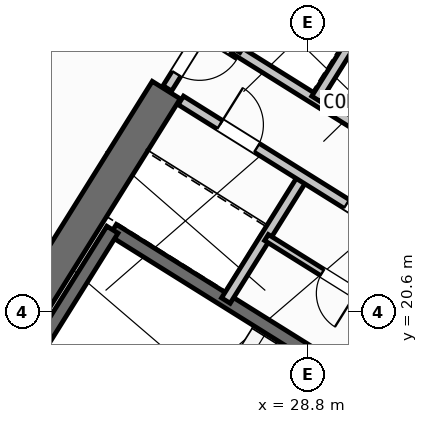
"""IFC4 building model, lengths in metres.
Left out: names, types, materials, properties, quantities, classifications, styles, units other than length and angle.
Written with IfcOpenShell. Run it as: python <this file> out.ifc"""

import sys

from ifc_helpers import new_model, si_unit, direction, frame, frame_2d, origin, place, context, subcontext, project, spatial, rectangle, extrude, source, transform, mapped, element, fill, save


model = new_model("IFC4")
c1 = context("Model", 3, precision=1e-05, world=origin(), true_north=direction((0.0, 1.0)))
c2 = subcontext(c1, "Body", "Model", "MODEL_VIEW")
j1 = project(units=[si_unit("LENGTHUNIT", "METRE"), si_unit("PLANEANGLEUNIT", "RADIAN")], contexts=[c1])
p1 = place(None, origin())
s1 = spatial("IfcSite", under=j1, at=p1, CompositionType="ELEMENT")
p2 = place(p1, origin())
s2 = spatial("IfcBuilding", under=s1, at=p2, CompositionType="ELEMENT")
p3 = place(p2, frame((0.0, 0.0, 42.0)))
s3 = spatial("IfcBuildingStorey", under=s2, at=p3, CompositionType="ELEMENT", Elevation=42.0)
p4 = place(p3, frame((40.615, 23.983, 0.0), z_axis=(0.0, 0.0, 1.0), x_axis=(-0.848045953968, 0.529922692436, 0.0)))
e1 = element("IfcWall", 1, at=p4, inside=s3, PredefinedType="SHEAR", context=c2, shape_type="SweptSolid", body=[
    extrude(rectangle(XDim=13.24, YDim=0.65, at=frame_2d((6.62, 0.0))), origin(), (0.0, 0.0, 1.0), 3.35),
])
p5 = place(p3, frame((26.007, 24.976, 0.0), z_axis=(0.0, 0.0, 1.0), x_axis=(-0.529916319127, -0.848049936456, 0.0)))
e2 = element("IfcWall", 2, at=p5, inside=s3, PredefinedType="SHEAR", context=c2, shape_type="SweptSolid", body=[
    extrude(rectangle(XDim=6.375, YDim=0.65, at=frame_2d((3.188, 0.0))), origin(), (0.0, 0.0, 1.0), 3.35),
])
p6 = place(p3, frame((29.268, 6.429, 0.0), z_axis=(0.0, 0.0, 1.0), x_axis=(-0.848049971435, 0.529916263149, 0.0)))
e3 = element("IfcWall", 3, at=p6, inside=s3, PredefinedType="STANDARD", context=c2, shape_type="SweptSolid", body=[
    extrude(rectangle(XDim=31.588, YDim=0.32, at=frame_2d((15.794, 0.0))), origin(), (0.0, 0.0, 1.0), 3.35),
])
p7 = place(p6, frame((16.362, 0.0, 0.0)))
e4 = element("IfcOpeningElement", 4, at=p7, cuts=e3, PredefinedType="OPENING", context=c2, shape_type="SweptSolid", body=[
    extrude(rectangle(XDim=1.2, YDim=2.15, at=frame_2d((0.6, 1.075))), frame((0.0, 0.17, 0.0), z_axis=(0.0, -1.0, 0.0), x_axis=(1.0, 0.0, 0.0)), (0.0, 0.0, 1.0), 0.34),
])
p8 = place(p6, frame((2.989, 0.0, 0.8)))
e5 = element("IfcOpeningElement", 5, at=p8, cuts=e3, PredefinedType="OPENING", context=c2, shape_type="SweptSolid", body=[
    extrude(rectangle(XDim=2.1, YDim=1.55, at=frame_2d((1.05, 0.775))), frame((0.0, 0.17, 0.0), z_axis=(0.0, -1.0, 0.0), x_axis=(1.0, 0.0, 0.0)), (0.0, 0.0, 1.0), 0.34),
])
p9 = place(p6, frame((8.359, 0.0, 0.8)))
e6 = element("IfcOpeningElement", 6, at=p9, cuts=e3, PredefinedType="OPENING", context=c2, shape_type="SweptSolid", body=[
    extrude(rectangle(XDim=2.1, YDim=1.55, at=frame_2d((1.05, 0.775))), frame((0.0, 0.17, 0.0), z_axis=(0.0, -1.0, 0.0), x_axis=(1.0, 0.0, 0.0)), (0.0, 0.0, 1.0), 0.34),
])
p10 = place(p6, frame((13.284, 0.0, 0.95)))
e7 = element("IfcOpeningElement", 7, at=p10, cuts=e3, PredefinedType="OPENING", context=c2, shape_type="SweptSolid", body=[
    extrude(rectangle(XDim=1.2, YDim=1.4, at=frame_2d((0.6, 0.7))), frame((0.0, 0.17, 0.0), z_axis=(0.0, -1.0, 0.0), x_axis=(1.0, 0.0, 0.0)), (0.0, 0.0, 1.0), 0.34),
])
p11 = place(p6, frame((20.39, 0.0, 0.95)))
e8 = element("IfcOpeningElement", 8, at=p11, cuts=e3, PredefinedType="OPENING", context=c2, shape_type="SweptSolid", body=[
    extrude(rectangle(XDim=1.2, YDim=1.4, at=frame_2d((0.6, 0.7))), frame((0.0, 0.17, 0.0), z_axis=(0.0, -1.0, 0.0), x_axis=(1.0, 0.0, 0.0)), (0.0, 0.0, 1.0), 0.34),
])
p12 = place(p6, frame((23.715, 0.0, 1.0)))
e9 = element("IfcOpeningElement", 9, at=p12, cuts=e3, PredefinedType="OPENING", context=c2, shape_type="SweptSolid", body=[
    extrude(rectangle(XDim=0.9, YDim=1.25, at=frame_2d((0.45, 0.625))), frame((0.0, 0.17, 0.0), z_axis=(0.0, -1.0, 0.0), x_axis=(1.0, 0.0, 0.0)), (0.0, 0.0, 1.0), 0.34),
])
p13 = place(p6, frame((27.481, 0.0, 0.8)))
e10 = element("IfcOpeningElement", 10, at=p13, cuts=e3, PredefinedType="OPENING", context=c2, shape_type="SweptSolid", body=[
    extrude(rectangle(XDim=2.1, YDim=1.55, at=frame_2d((1.05, 0.775))), frame((0.0, 0.17, 0.0), z_axis=(0.0, -1.0, 0.0), x_axis=(1.0, 0.0, 0.0)), (0.0, 0.0, 1.0), 0.34),
])
p14 = place(p3, frame((14.138, 41.825, 0.0), z_axis=(0.0, 0.0, 1.0), x_axis=(0.848046498049, -0.529921821731, 0.0)))
e11 = element("IfcWall", 11, at=p14, inside=s3, PredefinedType="STANDARD", context=c2, shape_type="SweptSolid", body=[
    extrude(rectangle(XDim=31.588, YDim=0.32, at=frame_2d((15.794, 0.0))), origin(), (0.0, 0.0, 1.0), 3.35),
])
p15 = place(p14, frame((3.369, 0.0, 0.0)))
e12 = element("IfcOpeningElement", 12, at=p15, cuts=e11, PredefinedType="OPENING", context=c2, shape_type="SweptSolid", body=[
    extrude(rectangle(XDim=1.05, YDim=2.15, at=frame_2d((0.525, 1.075))), frame((0.0, 0.17, 0.0), z_axis=(0.0, -1.0, 0.0), x_axis=(1.0, 0.0, 0.0)), (0.0, 0.0, 1.0), 0.34),
])
p16 = place(p14, frame((0.946, 0.0, 0.85)))
e13 = element("IfcOpeningElement", 13, at=p16, cuts=e11, PredefinedType="OPENING", context=c2, shape_type="SweptSolid", body=[
    extrude(rectangle(XDim=1.8, YDim=1.5, at=frame_2d((0.9, 0.75))), frame((0.0, 0.17, 0.0), z_axis=(0.0, -1.0, 0.0), x_axis=(1.0, 0.0, 0.0)), (0.0, 0.0, 1.0), 0.34),
])
p17 = place(p14, frame((8.46, 0.0, 0.85)))
e14 = element("IfcOpeningElement", 14, at=p17, cuts=e11, PredefinedType="OPENING", context=c2, shape_type="SweptSolid", body=[
    extrude(rectangle(XDim=1.8, YDim=1.5, at=frame_2d((0.9, 0.75))), frame((0.0, 0.17, 0.0), z_axis=(0.0, -1.0, 0.0), x_axis=(1.0, 0.0, 0.0)), (0.0, 0.0, 1.0), 0.34),
])
p18 = place(p14, frame((13.899, 0.0, 0.85)))
e15 = element("IfcOpeningElement", 15, at=p18, cuts=e11, PredefinedType="OPENING", context=c2, shape_type="SweptSolid", body=[
    extrude(rectangle(XDim=1.5, YDim=1.5, at=frame_2d((0.75, 0.75))), frame((0.0, 0.17, 0.0), z_axis=(0.0, -1.0, 0.0), x_axis=(1.0, 0.0, 0.0)), (0.0, 0.0, 1.0), 0.34),
])
p19 = place(p14, frame((22.019, 0.0, 0.95)))
e16 = element("IfcOpeningElement", 16, at=p19, cuts=e11, PredefinedType="OPENING", context=c2, shape_type="SweptSolid", body=[
    extrude(rectangle(XDim=1.2, YDim=1.4, at=frame_2d((0.6, 0.7))), frame((0.0, 0.17, 0.0), z_axis=(0.0, -1.0, 0.0), x_axis=(1.0, 0.0, 0.0)), (0.0, 0.0, 1.0), 0.34),
])
p20 = place(p14, frame((27.569, 0.0, 0.95)))
e17 = element("IfcOpeningElement", 17, at=p20, cuts=e11, PredefinedType="OPENING", context=c2, shape_type="SweptSolid", body=[
    extrude(rectangle(XDim=1.2, YDim=1.4, at=frame_2d((0.6, 0.7))), frame((0.0, 0.17, 0.0), z_axis=(0.0, -1.0, 0.0), x_axis=(1.0, 0.0, 0.0)), (0.0, 0.0, 1.0), 0.34),
])
p21 = place(p3, frame((31.28, 18.261, 0.0), z_axis=(0.0, 0.0, 1.0), x_axis=(-0.848051618787, 0.529913626805, 0.0)))
e18 = element("IfcWall", 18, at=p21, inside=s3, PredefinedType="SHEAR", context=c2, shape_type="SweptSolid", body=[
    extrude(rectangle(XDim=7.46, YDim=0.26, at=frame_2d((3.73, 0.0))), origin(), (0.0, 0.0, 1.0), 3.35),
])
p22 = place(p21, frame((0.36, 0.0, 0.0)))
e19 = element("IfcOpeningElement", 19, at=p22, cuts=e18, PredefinedType="OPENING", context=c2, shape_type="SweptSolid", body=[
    extrude(rectangle(XDim=0.86, YDim=2.05, at=frame_2d((0.43, 1.025))), frame((0.0, 0.14, 0.0), z_axis=(0.0, -1.0, 0.0), x_axis=(1.0, 0.0, 0.0)), (0.0, 0.0, 1.0), 0.28),
])
p23 = place(p3, frame((24.945, 22.22, 0.0), z_axis=(0.0, 0.0, 1.0), x_axis=(-0.529908658664, -0.84805472316, 0.0)))
e20 = element("IfcWall", 20, at=p23, inside=s3, PredefinedType="SHEAR", context=c2, shape_type="SweptSolid", body=[
    extrude(rectangle(XDim=3.16, YDim=0.26, at=frame_2d((1.58, 0.0))), origin(), (0.0, 0.0, 1.0), 3.35),
])
p24 = place(p3, frame((31.822, 24.998, 0.0), z_axis=(0.0, 0.0, 1.0), x_axis=(-0.848058348634, 0.529902856485, 0.0)))
e21 = element("IfcWall", 21, at=p24, inside=s3, PredefinedType="STANDARD", context=c2, shape_type="SweptSolid", body=[
    extrude(rectangle(XDim=4.568, YDim=0.2, at=frame_2d((2.284, 0.0))), origin(), (0.0, 0.0, 1.0), 3.34),
])
p25 = place(p3, frame((32.108, 22.814, 0.0), z_axis=(0.0, 0.0, 1.0), x_axis=(-0.848042229521, 0.529928652696, 0.0)))
e22 = element("IfcWall", 22, at=p25, inside=s3, PredefinedType="STANDARD", context=c2, shape_type="SweptSolid", body=[
    extrude(rectangle(XDim=5.62, YDim=0.2, at=frame_2d((2.81, 0.0))), origin(), (0.0, 0.0, 1.0), 3.34),
])
p26 = place(p3, frame((28.25, 27.17, 0.0), z_axis=(0.0, 0.0, 1.0), x_axis=(-0.529905827651, -0.848056492117, 0.0)))
e23 = element("IfcWall", 23, at=p26, inside=s3, PredefinedType="STANDARD", context=c2, shape_type="SweptSolid", body=[
    extrude(rectangle(XDim=1.65, YDim=0.2, at=frame_2d((0.825, 0.0))), origin(), (0.0, 0.0, 1.0), 3.34),
])
p27 = place(p3, frame((29.801, 26.142, 0.0), z_axis=(0.0, 0.0, 1.0), x_axis=(-0.529998940003, -0.847998304005, 0.0)))
e24 = element("IfcWall", 24, at=p27, inside=s3, PredefinedType="STANDARD", context=c2, shape_type="SweptSolid", body=[
    extrude(rectangle(XDim=1.58, YDim=0.2, at=frame_2d((0.79, 0.0))), origin(), (0.0, 0.0, 1.0), 3.34),
])
p28 = place(p3, frame((28.71, 23.263, 0.0), z_axis=(0.0, 0.0, 1.0), x_axis=(-0.529907497854, -0.848055448493, 0.0)))
e25 = element("IfcWall", 25, at=p28, inside=s3, PredefinedType="STANDARD", context=c2, shape_type="SweptSolid", body=[
    extrude(rectangle(XDim=2.88, YDim=0.2, at=frame_2d((1.44, 0.0))), origin(), (0.0, 0.0, 1.0), 3.34),
])
p29 = place(p3, frame((31.525, 21.504, 0.0), z_axis=(0.0, 0.0, 1.0), x_axis=(-0.848044998614, 0.529924221305, 0.0)))
e26 = element("IfcWall", 26, at=p29, inside=s3, PredefinedType="STANDARD", context=c2, shape_type="SweptSolid", body=[
    extrude(rectangle(XDim=6.168, YDim=0.2, at=frame_2d((3.084, 0.0))), origin(), (0.0, 0.0, 1.0), 3.34),
])
p30 = place(p29, frame((4.4, 0.0, 0.0)))
e27 = element("IfcOpeningElement", 27, at=p30, cuts=e26, PredefinedType="OPENING", context=c2, shape_type="SweptSolid", body=[
    extrude(rectangle(XDim=0.86, YDim=2.05, at=frame_2d((0.43, 1.025))), frame((0.0, 0.11, 0.0), z_axis=(0.0, -1.0, 0.0), x_axis=(1.0, 0.0, 0.0)), (0.0, 0.0, 1.0), 0.22),
])
p31 = place(p29, frame((1.45, 0.0, 0.0)))
e28 = element("IfcOpeningElement", 28, at=p31, cuts=e26, PredefinedType="OPENING", context=c2, shape_type="SweptSolid", body=[
    extrude(rectangle(XDim=0.86, YDim=2.05, at=frame_2d((0.43, 1.025))), frame((0.0, 0.11, 0.0), z_axis=(0.0, -1.0, 0.0), x_axis=(1.0, 0.0, 0.0)), (0.0, 0.0, 1.0), 0.22),
])
p32 = place(p3, frame((30.766, 20.327, 0.0), z_axis=(0.0, 0.0, 1.0), x_axis=(-0.848052663127, 0.529911955482, 0.0)))
e29 = element("IfcWall", 29, at=p32, inside=s3, PredefinedType="PLUMBINGWALL", context=c2, shape_type="SweptSolid", body=[
    extrude(rectangle(XDim=3.28, YDim=0.14, at=frame_2d((1.64, 0.0))), origin(), (0.0, 0.0, 1.0), 3.34),
])
p33 = place(p32, frame((1.2, 0.0, 0.0)))
e30 = element("IfcOpeningElement", 30, at=p33, cuts=e29, PredefinedType="OPENING", context=c2, shape_type="SweptSolid", body=[
    extrude(rectangle(XDim=0.78, YDim=2.05, at=frame_2d((0.39, 1.025))), frame((0.0, 0.08, 0.0), z_axis=(0.0, -1.0, 0.0), x_axis=(1.0, 0.0, 0.0)), (0.0, 0.0, 1.0), 0.16),
])
p34 = place(p3, frame((27.596, 27.52, 0.0), z_axis=(0.0, 0.0, 1.0), x_axis=(-0.529865479138, -0.848081702443, 0.0)))
e31 = element("IfcWall", 31, at=p34, inside=s3, PredefinedType="STANDARD", context=c2, shape_type="SweptSolid", body=[
    extrude(rectangle(XDim=2.96, YDim=0.2, at=frame_2d((1.48, 0.0))), origin(), (0.0, 0.0, 1.0), 3.34),
])
p35 = place(p34, frame((1.76, 0.0, 0.0)))
e32 = element("IfcOpeningElement", 32, at=p35, cuts=e31, PredefinedType="OPENING", context=c2, shape_type="SweptSolid", body=[
    extrude(rectangle(XDim=0.86, YDim=2.05, at=frame_2d((0.43, 1.025))), frame((0.0, 0.11, 0.0), z_axis=(0.0, -1.0, 0.0), x_axis=(1.0, 0.0, 0.0)), (0.0, 0.0, 1.0), 0.22),
])
p36 = place(p3, frame((25.807, 29.582, 0.0), z_axis=(0.0, 0.0, 1.0), x_axis=(-0.529918119251, -0.84804881162, 0.0)))
e33 = element("IfcWall", 33, at=p36, inside=s3, PredefinedType="PARTITIONING", context=c2, shape_type="SweptSolid", body=[
    extrude(rectangle(XDim=17.65, YDim=0.16, at=frame_2d((8.825, 0.0))), origin(), (0.0, 0.0, 1.0), 3.34),
])
m1 = source(origin(), c2, "Body", "SweptSolid", [
    extrude(rectangle(XDim=0.86, YDim=2.05, at=frame_2d((0.43, 1.025))), frame((0.0, 0.025, 0.0), z_axis=(0.0, -1.0, 0.0), x_axis=(1.0, 0.0, 0.0)), (0.0, 0.0, 1.0), 0.05),
])
p37 = place(p30, frame((0.86, 0.0, 0.0), z_axis=(0.0, 0.0, 1.0), x_axis=(-1.0, 0.0, 0.0)))
e34 = element("IfcDoor", 34, at=p37, inside=s3, OperationType="SINGLE_SWING_LEFT", PredefinedType="DOOR", context=c2, shape_type="MappedRepresentation", body=[
    mapped(m1, transform((0.0, 0.0, 0.0), scale=1.0)),
])
fill(e27, e34)
p38 = place(p31, frame((0.86, 0.0, 0.0), z_axis=(0.0, 0.0, 1.0), x_axis=(-1.0, 0.0, 0.0)))
e35 = element("IfcDoor", 35, at=p38, inside=s3, OperationType="SINGLE_SWING_RIGHT", PredefinedType="DOOR", context=c2, shape_type="MappedRepresentation", body=[
    mapped(m1, transform((0.0, 0.0, 0.0), scale=1.0)),
])
fill(e28, e35)
m2 = source(origin(), c2, "Body", "SweptSolid", [
    extrude(rectangle(XDim=0.78, YDim=2.05, at=frame_2d((0.39, 1.025))), frame((0.0, 0.025, 0.0), z_axis=(0.0, -1.0, 0.0), x_axis=(1.0, 0.0, 0.0)), (0.0, 0.0, 1.0), 0.05),
])
p39 = place(p33, origin())
e36 = element("IfcDoor", 36, at=p39, inside=s3, OperationType="SINGLE_SWING_LEFT", PredefinedType="DOOR", context=c2, shape_type="MappedRepresentation", body=[
    mapped(m2, transform((0.0, 0.0, 0.0), scale=1.0)),
])
fill(e30, e36)
p40 = place(p35, origin())
e37 = element("IfcDoor", 37, at=p40, inside=s3, OperationType="SINGLE_SWING_LEFT", PredefinedType="DOOR", context=c2, shape_type="MappedRepresentation", body=[
    mapped(m1, transform((0.0, 0.0, 0.0), scale=1.0)),
])
fill(e32, e37)
save(model, sys.argv[1])
